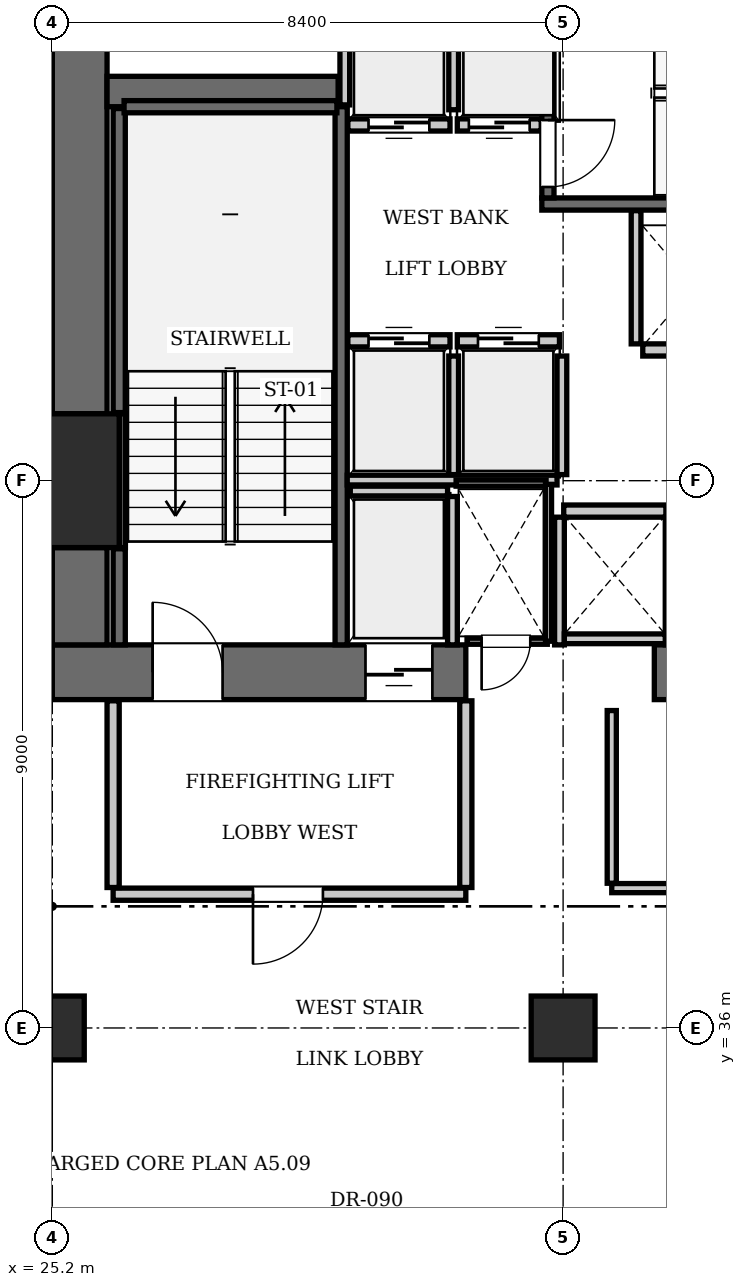
"""IFC4 building model, lengths in metres.
Left out: names, types, materials, properties, quantities, classifications, styles, units other than length and angle.
Written with IfcOpenShell. Run it as: python <this file> out.ifc"""

import sys

from ifc_helpers import new_model, si_unit, direction, frame, frame_2d, origin, origin_2d, place, context, subcontext, project, spatial, rectangle, extrude, element, fill, save


model = new_model("IFC4")
c1 = context("Model", 3, precision=1e-05, world=origin(), true_north=direction((0.0, 1.0)))
c2 = subcontext(c1, "Body", "Model", "MODEL_VIEW")
j1 = project(units=[si_unit("LENGTHUNIT", "METRE"), si_unit("PLANEANGLEUNIT", "RADIAN")], contexts=[c1])
p1 = place(None, origin())
s1 = spatial("IfcSite", under=j1, at=p1, CompositionType="ELEMENT")
p2 = place(p1, origin())
s2 = spatial("IfcBuilding", under=s1, at=p2, CompositionType="ELEMENT")
p3 = place(p2, frame((0.0, 0.0, 30.8)))
s3 = spatial("IfcBuildingStorey", under=s2, at=p3, CompositionType="ELEMENT", Elevation=30.8)
p4 = place(p3, frame((25.2, 45.0, 0.0), z_axis=(0.0, 0.0, 1.0), x_axis=(1.0, 0.0, 0.0)))
e1 = element("IfcColumn", 1, at=p4, inside=s3, PredefinedType="COLUMN", context=c2, shape_type="SweptSolid", body=[
    extrude(rectangle(XDim=2.2, YDim=2.2, at=origin_2d()), origin(), (0.0, 0.0, 1.0), 3.85),
])
p5 = place(p3, frame((25.2, 41.85, 0.0), z_axis=(0.0, 0.0, 1.0), x_axis=(1.0, 0.0, 0.0)))
e2 = element("IfcWall", 2, at=p5, inside=s3, PredefinedType="SHEAR", context=c2, shape_type="SweptSolid", body=[
    extrude(rectangle(XDim=6.8, YDim=0.9, at=frame_2d((3.4, 0.0))), origin(), (0.0, 0.0, 1.0), 3.85),
])
p6 = place(p5, frame((1.65, 0.0, 0.0)))
e3 = element("IfcOpeningElement", 3, at=p6, cuts=e2, PredefinedType="OPENING", context=c2, shape_type="SweptSolid", body=[
    extrude(rectangle(XDim=1.15, YDim=2.15, at=frame_2d((0.575, 1.075))), frame((0.0, 0.46, 0.0), z_axis=(0.0, -1.0, 0.0), x_axis=(1.0, 0.0, 0.0)), (0.0, 0.0, 1.0), 0.92),
])
p7 = place(p5, frame((5.15, 0.0, 0.0)))
e4 = element("IfcOpeningElement", 4, at=p7, cuts=e2, PredefinedType="OPENING", context=c2, shape_type="SweptSolid", body=[
    extrude(rectangle(XDim=1.1, YDim=2.2, at=frame_2d((0.55, 1.1))), frame((0.0, 0.46, 0.0), z_axis=(0.0, -1.0, 0.0), x_axis=(1.0, 0.0, 0.0)), (0.0, 0.0, 1.0), 0.92),
])
p8 = place(p3, frame((35.1, 41.85, 0.0), z_axis=(0.0, 0.0, 1.0), x_axis=(1.0, 0.0, 0.0)))
e5 = element("IfcWall", 5, at=p8, inside=s3, PredefinedType="SHEAR", context=c2, shape_type="SweptSolid", body=[
    extrude(rectangle(XDim=5.4, YDim=0.9, at=frame_2d((2.7, 0.0))), origin(), (0.0, 0.0, 1.0), 3.85),
])
p9 = place(p3, frame((25.65, 42.3, 0.0), z_axis=(0.0, 0.0, 1.0), x_axis=(0.0, 1.0, 0.0)))
e6 = element("IfcWall", 6, at=p9, inside=s3, PredefinedType="SHEAR", context=c2, shape_type="SweptSolid", body=[
    extrude(rectangle(XDim=1.6, YDim=0.9, at=frame_2d((0.8, 0.0))), origin(), (0.0, 0.0, 1.0), 3.85),
])
p10 = place(p3, frame((25.65, 46.1, 0.0), z_axis=(0.0, 0.0, 1.0), x_axis=(0.0, 1.0, 0.0)))
e7 = element("IfcWall", 7, at=p10, inside=s3, PredefinedType="SHEAR", context=c2, shape_type="SweptSolid", body=[
    extrude(rectangle(XDim=7.0, YDim=0.9, at=frame_2d((3.5, 0.0))), origin(), (0.0, 0.0, 1.0), 3.85),
])
p11 = place(p3, frame((26.1, 51.4, 0.0), z_axis=(0.0, 0.0, 1.0), x_axis=(1.0, 0.0, 0.0)))
e8 = element("IfcWall", 8, at=p11, inside=s3, PredefinedType="SHEAR", context=c2, shape_type="SweptSolid", body=[
    extrude(rectangle(XDim=3.8, YDim=0.5, at=frame_2d((1.9, 0.0))), origin(), (0.0, 0.0, 1.0), 3.85),
])
for number, where, z_axis, x_axis in (
    (9, (25.2, 36.0, 0.0), (0.0, 0.0, 1.0), (1.0, 0.0, 0.0)),
    (10, (33.6, 36.0, 0.0), (0.0, 0.0, 1.0), (1.0, 0.0, 0.0)),
):
    element("IfcColumn", number, at=place(p3, frame(where, z_axis=z_axis, x_axis=x_axis)), inside=s3, PredefinedType="COLUMN", context=c2, shape_type="SweptSolid", body=[
        extrude(rectangle(XDim=1.05, YDim=1.05, at=origin_2d()), origin(), (0.0, 0.0, 1.0), 3.85),
    ])
p12 = place(p3, frame((29.95, 42.3, 0.0), z_axis=(0.0, 0.0, 1.0), x_axis=(0.0, 1.0, 0.0)))
e11 = element("IfcWall", 11, at=p12, inside=s3, PredefinedType="SOLIDWALL", context=c2, shape_type="SweptSolid", body=[
    extrude(rectangle(XDim=8.85, YDim=0.2, at=frame_2d((4.425, 0.0))), origin(), (0.0, 0.0, 1.0), 3.61),
])
p13 = place(p3, frame((26.3, 42.3, 0.0), z_axis=(0.0, 0.0, 1.0), x_axis=(0.0, 1.0, 0.0)))
e12 = element("IfcWall", 12, at=p13, inside=s3, PredefinedType="SOLIDWALL", context=c2, shape_type="SweptSolid", body=[
    extrude(rectangle(XDim=1.58, YDim=0.2, at=frame_2d((0.79, 0.0))), origin(), (0.0, 0.0, 1.0), 3.61),
])
p14 = place(p3, frame((26.3, 46.12, 0.0), z_axis=(0.0, 0.0, 1.0), x_axis=(0.0, 1.0, 0.0)))
e13 = element("IfcWall", 13, at=p14, inside=s3, PredefinedType="SOLIDWALL", context=c2, shape_type="SweptSolid", body=[
    extrude(rectangle(XDim=5.0, YDim=0.2, at=frame_2d((2.5, 0.0))), origin(), (0.0, 0.0, 1.0), 3.61),
])
p15 = place(p3, frame((26.38, 51.15, 0.0), z_axis=(0.0, 0.0, 1.0), x_axis=(1.0, 0.0, 0.0)))
e14 = element("IfcWall", 14, at=p15, inside=s3, PredefinedType="SOLIDWALL", context=c2, shape_type="SweptSolid", body=[
    extrude(rectangle(XDim=3.5, YDim=0.2, at=frame_2d((1.75, 0.0))), origin(), (0.0, 0.0, 1.0), 3.61),
])
p16 = place(p3, frame((26.352, 43.9, 0.0), z_axis=(0.0, 0.0, 1.0), x_axis=(0.0, 1.0, 0.0)))
e15 = element("IfcWall", 15, at=p16, inside=s3, PredefinedType="SOLIDWALL", context=c2, shape_type="SweptSolid", body=[
    extrude(rectangle(XDim=2.2, YDim=0.1, at=frame_2d((1.1, 0.0))), origin(), (0.0, 0.0, 1.0), 3.61),
])
p17 = place(p3, frame((33.25, 49.55, 0.0), z_axis=(0.0, 0.0, 1.0), x_axis=(1.0, 0.0, 0.0)))
e16 = element("IfcWall", 16, at=p17, inside=s3, PredefinedType="SOLIDWALL", context=c2, shape_type="SweptSolid", body=[
    extrude(rectangle(XDim=9.1, YDim=0.2, at=frame_2d((4.55, 0.0))), origin(), (0.0, 0.0, 1.0), 3.61),
])
p18 = place(p3, frame((33.35, 49.65, 0.0), z_axis=(0.0, 0.0, 1.0), x_axis=(0.0, 1.0, 0.0)))
e17 = element("IfcWall", 17, at=p18, inside=s3, PredefinedType="SOLIDWALL", context=c2, shape_type="SweptSolid", body=[
    extrude(rectangle(XDim=3.45, YDim=0.2, at=frame_2d((1.725, 0.0))), origin(), (0.0, 0.0, 1.0), 3.61),
])
p19 = place(p18, frame((0.18, 0.0, 0.0)))
e18 = element("IfcOpeningElement", 18, at=p19, cuts=e17, PredefinedType="OPENING", context=c2, shape_type="SweptSolid", body=[
    extrude(rectangle(XDim=1.1, YDim=2.15, at=frame_2d((0.55, 1.075))), frame((0.0, 0.11, 0.0), z_axis=(0.0, -1.0, 0.0), x_axis=(1.0, 0.0, 0.0)), (0.0, 0.0, 1.0), 0.22),
])
p20 = place(p3, frame((30.06, 47.3, 0.0), z_axis=(0.0, 0.0, 1.0), x_axis=(1.0, 0.0, 0.0)))
e19 = element("IfcWall", 19, at=p20, inside=s3, PredefinedType="SOLIDWALL", context=c2, shape_type="SweptSolid", body=[
    extrude(rectangle(XDim=1.68, YDim=0.2, at=frame_2d((0.84, 0.0))), origin(), (0.0, 0.0, 1.0), 3.61),
])
p21 = place(p20, frame((0.34, 0.0, 0.0)))
e20 = element("IfcOpeningElement", 20, at=p21, cuts=e19, PredefinedType="OPENING", context=c2, shape_type="SweptSolid", body=[
    extrude(rectangle(XDim=1.0, YDim=2.15, at=frame_2d((0.5, 1.075))), frame((0.0, 0.11, 0.0), z_axis=(0.0, -1.0, 0.0), x_axis=(1.0, 0.0, 0.0)), (0.0, 0.0, 1.0), 0.22),
])
p22 = place(p3, frame((31.86, 47.3, 0.0), z_axis=(0.0, 0.0, 1.0), x_axis=(1.0, 0.0, 0.0)))
e21 = element("IfcWall", 21, at=p22, inside=s3, PredefinedType="SOLIDWALL", context=c2, shape_type="SweptSolid", body=[
    extrude(rectangle(XDim=1.68, YDim=0.2, at=frame_2d((0.84, 0.0))), origin(), (0.0, 0.0, 1.0), 3.61),
])
p23 = place(p22, frame((0.34, 0.0, 0.0)))
e22 = element("IfcOpeningElement", 22, at=p23, cuts=e21, PredefinedType="OPENING", context=c2, shape_type="SweptSolid", body=[
    extrude(rectangle(XDim=1.0, YDim=2.15, at=frame_2d((0.5, 1.075))), frame((0.0, 0.11, 0.0), z_axis=(0.0, -1.0, 0.0), x_axis=(1.0, 0.0, 0.0)), (0.0, 0.0, 1.0), 0.22),
])
p24 = place(p3, frame((30.06, 50.85, 0.0), z_axis=(0.0, 0.0, 1.0), x_axis=(1.0, 0.0, 0.0)))
e23 = element("IfcWall", 23, at=p24, inside=s3, PredefinedType="SOLIDWALL", context=c2, shape_type="SweptSolid", body=[
    extrude(rectangle(XDim=1.68, YDim=0.2, at=frame_2d((0.84, 0.0))), origin(), (0.0, 0.0, 1.0), 3.61),
])
p25 = place(p24, frame((0.34, 0.0, 0.0)))
e24 = element("IfcOpeningElement", 24, at=p25, cuts=e23, PredefinedType="OPENING", context=c2, shape_type="SweptSolid", body=[
    extrude(rectangle(XDim=1.0, YDim=2.15, at=frame_2d((0.5, 1.075))), frame((0.0, 0.11, 0.0), z_axis=(0.0, -1.0, 0.0), x_axis=(1.0, 0.0, 0.0)), (0.0, 0.0, 1.0), 0.22),
])
p26 = place(p3, frame((31.86, 50.85, 0.0), z_axis=(0.0, 0.0, 1.0), x_axis=(1.0, 0.0, 0.0)))
e25 = element("IfcWall", 25, at=p26, inside=s3, PredefinedType="SOLIDWALL", context=c2, shape_type="SweptSolid", body=[
    extrude(rectangle(XDim=1.38, YDim=0.2, at=frame_2d((0.69, 0.0))), origin(), (0.0, 0.0, 1.0), 3.61),
])
p27 = place(p26, frame((0.19, 0.0, 0.0)))
e26 = element("IfcOpeningElement", 26, at=p27, cuts=e25, PredefinedType="OPENING", context=c2, shape_type="SweptSolid", body=[
    extrude(rectangle(XDim=1.0, YDim=2.15, at=frame_2d((0.5, 1.075))), frame((0.0, 0.11, 0.0), z_axis=(0.0, -1.0, 0.0), x_axis=(1.0, 0.0, 0.0)), (0.0, 0.0, 1.0), 0.22),
])
p28 = place(p3, frame((34.91, 47.15, 0.0), z_axis=(0.0, 0.0, 1.0), x_axis=(1.0, 0.0, 0.0)))
e27 = element("IfcWall", 27, at=p28, inside=s3, PredefinedType="SOLIDWALL", context=c2, shape_type="SweptSolid", body=[
    extrude(rectangle(XDim=1.68, YDim=0.2, at=frame_2d((0.84, 0.0))), origin(), (0.0, 0.0, 1.0), 3.61),
])
p29 = place(p3, frame((33.61, 44.5, 0.0), z_axis=(0.0, 0.0, 1.0), x_axis=(1.0, 0.0, 0.0)))
e28 = element("IfcWall", 28, at=p29, inside=s3, PredefinedType="SOLIDWALL", context=c2, shape_type="SweptSolid", body=[
    extrude(rectangle(XDim=1.68, YDim=0.2, at=frame_2d((0.84, 0.0))), origin(), (0.0, 0.0, 1.0), 3.61),
])
p30 = place(p3, frame((30.1, 44.83, 0.0), z_axis=(0.0, 0.0, 1.0), x_axis=(1.0, 0.0, 0.0)))
e29 = element("IfcWall", 29, at=p30, inside=s3, PredefinedType="SOLIDWALL", context=c2, shape_type="SweptSolid", body=[
    extrude(rectangle(XDim=1.6, YDim=0.16, at=frame_2d((0.8, 0.0))), origin(), (0.0, 0.0, 1.0), 3.61),
])
p31 = place(p3, frame((31.78, 42.3, 0.0), z_axis=(0.0, 0.0, 1.0), x_axis=(0.0, 1.0, 0.0)))
e30 = element("IfcWall", 30, at=p31, inside=s3, PredefinedType="SOLIDWALL", context=c2, shape_type="SweptSolid", body=[
    extrude(rectangle(XDim=2.44, YDim=0.16, at=frame_2d((1.22, 0.0))), origin(), (0.0, 0.0, 1.0), 3.61),
])
for number, where, z_axis, x_axis in (
    (31, (31.8, 45.1, 0.0), (0.0, 0.0, 1.0), (0.0, 1.0, 0.0)),
    (32, (33.58, 45.1, 0.0), (0.0, 0.0, 1.0), (0.0, 1.0, 0.0)),
):
    element("IfcWall", number, at=place(p3, frame(where, z_axis=z_axis, x_axis=x_axis)), inside=s3, PredefinedType="SOLIDWALL", context=c2, shape_type="SweptSolid", body=[
        extrude(rectangle(XDim=1.95, YDim=0.16, at=frame_2d((0.975, 0.0))), origin(), (0.0, 0.0, 1.0), 3.61),
    ])
p32 = place(p3, frame((30.05, 45.01, 0.0), z_axis=(0.0, 0.0, 1.0), x_axis=(1.0, 0.0, 0.0)))
e33 = element("IfcWall", 33, at=p32, inside=s3, PredefinedType="SOLIDWALL", context=c2, shape_type="SweptSolid", body=[
    extrude(rectangle(XDim=3.45, YDim=0.16, at=frame_2d((1.725, 0.0))), origin(), (0.0, 0.0, 1.0), 3.61),
])
p33 = place(p3, frame((30.01, 51.18, 0.0), z_axis=(0.0, 0.0, 1.0), x_axis=(0.0, 1.0, 0.0)))
e34 = element("IfcWall", 34, at=p33, inside=s3, PredefinedType="SOLIDWALL", context=c2, shape_type="SweptSolid", body=[
    extrude(rectangle(XDim=1.92, YDim=0.16, at=frame_2d((0.96, 0.0))), origin(), (0.0, 0.0, 1.0), 3.61),
])
p34 = place(p3, frame((31.8, 51.1, 0.0), z_axis=(0.0, 0.0, 1.0), x_axis=(0.0, 1.0, 0.0)))
e35 = element("IfcWall", 35, at=p34, inside=s3, PredefinedType="SOLIDWALL", context=c2, shape_type="SweptSolid", body=[
    extrude(rectangle(XDim=2.0, YDim=0.16, at=frame_2d((1.0, 0.0))), origin(), (0.0, 0.0, 1.0), 3.61),
])
p35 = place(p3, frame((34.8, 47.25, 0.0), z_axis=(0.0, 0.0, 1.0), x_axis=(0.0, 1.0, 0.0)))
e36 = element("IfcWall", 36, at=p35, inside=s3, PredefinedType="SOLIDWALL", context=c2, shape_type="SweptSolid", body=[
    extrude(rectangle(XDim=2.19, YDim=0.16, at=frame_2d((1.095, 0.0))), origin(), (0.0, 0.0, 1.0), 3.61),
])
for number, where, z_axis, x_axis in (
    (37, (33.54, 42.3, 0.0), (0.0, 0.0, 1.0), (0.0, 1.0, 0.0)),
    (38, (35.36, 42.3, 0.0), (0.0, 0.0, 1.0), (0.0, 1.0, 0.0)),
):
    element("IfcWall", number, at=place(p3, frame(where, z_axis=z_axis, x_axis=x_axis)), inside=s3, PredefinedType="SOLIDWALL", context=c2, shape_type="SweptSolid", body=[
        extrude(rectangle(XDim=2.1, YDim=0.16, at=frame_2d((1.05, 0.0))), origin(), (0.0, 0.0, 1.0), 3.61),
    ])
p36 = place(p3, frame((33.62, 42.4, 0.0), z_axis=(0.0, 0.0, 1.0), x_axis=(1.0, 0.0, 0.0)))
e39 = element("IfcWall", 39, at=p36, inside=s3, PredefinedType="SOLIDWALL", context=c2, shape_type="SweptSolid", body=[
    extrude(rectangle(XDim=1.66, YDim=0.16, at=frame_2d((0.83, 0.0))), origin(), (0.0, 0.0, 1.0), 3.61),
])
p37 = place(p3, frame((26.2, 38.2, 0.0), z_axis=(0.0, 0.0, 1.0), x_axis=(1.0, 0.0, 0.0)))
e40 = element("IfcWall", 40, at=p37, inside=s3, PredefinedType="PARTITIONING", context=c2, shape_type="SweptSolid", body=[
    extrude(rectangle(XDim=5.8, YDim=0.2, at=frame_2d((2.9, 0.0))), origin(), (0.0, 0.0, 1.0), 3.61),
])
p38 = place(p37, frame((2.3, 0.0, 0.0)))
e41 = element("IfcOpeningElement", 41, at=p38, cuts=e40, PredefinedType="OPENING", context=c2, shape_type="SweptSolid", body=[
    extrude(rectangle(XDim=1.15, YDim=2.15, at=frame_2d((0.575, 1.075))), frame((0.0, 0.11, 0.0), z_axis=(0.0, -1.0, 0.0), x_axis=(1.0, 0.0, 0.0)), (0.0, 0.0, 1.0), 0.22),
])
for number, where, z_axis, x_axis in (
    (42, (26.2, 38.31, 0.0), (0.0, 0.0, 1.0), (0.0, 1.0, 0.0)),
    (43, (32.0, 38.31, 0.0), (0.0, 0.0, 1.0), (0.0, 1.0, 0.0)),
):
    element("IfcWall", number, at=place(p3, frame(where, z_axis=z_axis, x_axis=x_axis)), inside=s3, PredefinedType="PARTITIONING", context=c2, shape_type="SweptSolid", body=[
        extrude(rectangle(XDim=3.07, YDim=0.2, at=frame_2d((1.535, 0.0))), origin(), (0.0, 0.0, 1.0), 3.61),
    ])
p39 = place(p3, frame((32.02, 42.36, 0.0), z_axis=(0.0, 0.0, 1.0), x_axis=(1.0, 0.0, 0.0)))
e44 = element("IfcWall", 44, at=p39, inside=s3, PredefinedType="PARTITIONING", context=c2, shape_type="SweptSolid", body=[
    extrude(rectangle(XDim=1.32, YDim=0.1, at=frame_2d((0.66, 0.0))), origin(), (0.0, 0.0, 1.0), 3.61),
])
p40 = place(p39, frame((0.24, 0.0, 0.0)))
e45 = element("IfcOpeningElement", 45, at=p40, cuts=e44, PredefinedType="OPENING", context=c2, shape_type="SweptSolid", body=[
    extrude(rectangle(XDim=0.8, YDim=2.05, at=frame_2d((0.4, 1.025))), frame((0.0, 0.06, 0.0), z_axis=(0.0, -1.0, 0.0), x_axis=(1.0, 0.0, 0.0)), (0.0, 0.0, 1.0), 0.12),
])
p41 = place(p3, frame((31.84, 44.96, 0.0), z_axis=(0.0, 0.0, 1.0), x_axis=(1.0, 0.0, 0.0)))
e46 = element("IfcWall", 46, at=p41, inside=s3, PredefinedType="PARTITIONING", context=c2, shape_type="SweptSolid", body=[
    extrude(rectangle(XDim=1.48, YDim=0.1, at=frame_2d((0.74, 0.0))), origin(), (0.0, 0.0, 1.0), 3.61),
])
p42 = place(p3, frame((33.36, 42.36, 0.0), z_axis=(0.0, 0.0, 1.0), x_axis=(0.0, 1.0, 0.0)))
e47 = element("IfcWall", 47, at=p42, inside=s3, PredefinedType="PARTITIONING", context=c2, shape_type="SweptSolid", body=[
    extrude(rectangle(XDim=2.58, YDim=0.1, at=frame_2d((1.29, 0.0))), origin(), (0.0, 0.0, 1.0), 3.61),
])
p43 = place(p3, frame((34.4, 38.3, 0.0), z_axis=(0.0, 0.0, 1.0), x_axis=(1.0, 0.0, 0.0)))
e48 = element("IfcWall", 48, at=p43, inside=s3, PredefinedType="PARTITIONING", context=c2, shape_type="SweptSolid", body=[
    extrude(rectangle(XDim=5.92, YDim=0.15, at=frame_2d((2.96, 0.0))), origin(), (0.0, 0.0, 1.0), 3.61),
])
p44 = place(p43, frame((2.4, 0.0, 0.0)))
e49 = element("IfcOpeningElement", 49, at=p44, cuts=e48, PredefinedType="OPENING", context=c2, shape_type="SweptSolid", body=[
    extrude(rectangle(XDim=0.9, YDim=2.1, at=frame_2d((0.45, 1.05))), frame((0.0, 0.085, 0.0), z_axis=(0.0, -1.0, 0.0), x_axis=(1.0, 0.0, 0.0)), (0.0, 0.0, 1.0), 0.17),
])
p45 = place(p3, frame((34.4, 38.38, 0.0), z_axis=(0.0, 0.0, 1.0), x_axis=(0.0, 1.0, 0.0)))
e50 = element("IfcWall", 50, at=p45, inside=s3, PredefinedType="PARTITIONING", context=c2, shape_type="SweptSolid", body=[
    extrude(rectangle(XDim=2.84, YDim=0.15, at=frame_2d((1.42, 0.0))), origin(), (0.0, 0.0, 1.0), 3.61),
])
p46 = place(p6, origin())
e51 = element("IfcDoor", 51, at=p46, inside=s3, OperationType="SINGLE_SWING_LEFT", PredefinedType="DOOR", context=c2, shape_type="SweptSolid", body=[
    extrude(rectangle(XDim=1.15, YDim=2.15, at=frame_2d((0.575, 1.075))), frame((0.0, 0.025, 0.0), z_axis=(0.0, -1.0, 0.0), x_axis=(1.0, 0.0, 0.0)), (0.0, 0.0, 1.0), 0.05),
])
fill(e3, e51)
p47 = place(p19, frame((1.1, 0.0, 0.0), z_axis=(0.0, 0.0, 1.0), x_axis=(-1.0, 0.0, 0.0)))
e52 = element("IfcDoor", 52, at=p47, inside=s3, OperationType="SINGLE_SWING_LEFT", PredefinedType="DOOR", context=c2, shape_type="SweptSolid", body=[
    extrude(rectangle(XDim=1.1, YDim=2.15, at=frame_2d((0.55, 1.075))), frame((0.0, 0.025, 0.0), z_axis=(0.0, -1.0, 0.0), x_axis=(1.0, 0.0, 0.0)), (0.0, 0.0, 1.0), 0.05),
])
fill(e18, e52)
p48 = place(p21, origin())
e53 = element("IfcDoor", 53, at=p48, inside=s3, OperationType="SLIDING_TO_LEFT", PredefinedType="DOOR", context=c2, shape_type="SweptSolid", body=[
    extrude(rectangle(XDim=1.0, YDim=2.15, at=frame_2d((0.5, 1.075))), frame((0.0, 0.025, 0.0), z_axis=(0.0, -1.0, 0.0), x_axis=(1.0, 0.0, 0.0)), (0.0, 0.0, 1.0), 0.05),
])
fill(e20, e53)
p49 = place(p23, origin())
e54 = element("IfcDoor", 54, at=p49, inside=s3, OperationType="SLIDING_TO_LEFT", PredefinedType="DOOR", context=c2, shape_type="SweptSolid", body=[
    extrude(rectangle(XDim=1.0, YDim=2.15, at=frame_2d((0.5, 1.075))), frame((0.0, 0.025, 0.0), z_axis=(0.0, -1.0, 0.0), x_axis=(1.0, 0.0, 0.0)), (0.0, 0.0, 1.0), 0.05),
])
fill(e22, e54)
p50 = place(p25, frame((1.0, 0.0, 0.0), z_axis=(0.0, 0.0, 1.0), x_axis=(-1.0, 0.0, 0.0)))
e55 = element("IfcDoor", 55, at=p50, inside=s3, OperationType="SLIDING_TO_LEFT", PredefinedType="DOOR", context=c2, shape_type="SweptSolid", body=[
    extrude(rectangle(XDim=1.0, YDim=2.15, at=frame_2d((0.5, 1.075))), frame((0.0, 0.025, 0.0), z_axis=(0.0, -1.0, 0.0), x_axis=(1.0, 0.0, 0.0)), (0.0, 0.0, 1.0), 0.05),
])
fill(e24, e55)
p51 = place(p27, frame((1.0, 0.0, 0.0), z_axis=(0.0, 0.0, 1.0), x_axis=(-1.0, 0.0, 0.0)))
e56 = element("IfcDoor", 56, at=p51, inside=s3, OperationType="SLIDING_TO_LEFT", PredefinedType="DOOR", context=c2, shape_type="SweptSolid", body=[
    extrude(rectangle(XDim=1.0, YDim=2.15, at=frame_2d((0.5, 1.075))), frame((0.0, 0.025, 0.0), z_axis=(0.0, -1.0, 0.0), x_axis=(1.0, 0.0, 0.0)), (0.0, 0.0, 1.0), 0.05),
])
fill(e26, e56)
p52 = place(p7, frame((1.1, 0.0, 0.0), z_axis=(0.0, 0.0, 1.0), x_axis=(-1.0, 0.0, 0.0)))
e57 = element("IfcDoor", 57, at=p52, inside=s3, OperationType="SLIDING_TO_LEFT", PredefinedType="DOOR", context=c2, shape_type="SweptSolid", body=[
    extrude(rectangle(XDim=1.1, YDim=2.2, at=frame_2d((0.55, 1.1))), frame((0.0, 0.025, 0.0), z_axis=(0.0, -1.0, 0.0), x_axis=(1.0, 0.0, 0.0)), (0.0, 0.0, 1.0), 0.05),
])
fill(e4, e57)
p53 = place(p38, frame((1.15, 0.0, 0.0), z_axis=(0.0, 0.0, 1.0), x_axis=(-1.0, 0.0, 0.0)))
e58 = element("IfcDoor", 58, at=p53, inside=s3, OperationType="SINGLE_SWING_RIGHT", PredefinedType="DOOR", context=c2, shape_type="SweptSolid", body=[
    extrude(rectangle(XDim=1.15, YDim=2.15, at=frame_2d((0.575, 1.075))), frame((0.0, 0.025, 0.0), z_axis=(0.0, -1.0, 0.0), x_axis=(1.0, 0.0, 0.0)), (0.0, 0.0, 1.0), 0.05),
])
fill(e41, e58)
p54 = place(p40, frame((0.8, 0.0, 0.0), z_axis=(0.0, 0.0, 1.0), x_axis=(-1.0, 0.0, 0.0)))
e59 = element("IfcDoor", 59, at=p54, inside=s3, OperationType="SINGLE_SWING_RIGHT", PredefinedType="DOOR", context=c2, shape_type="SweptSolid", body=[
    extrude(rectangle(XDim=0.8, YDim=2.05, at=frame_2d((0.4, 1.025))), frame((0.0, 0.025, 0.0), z_axis=(0.0, -1.0, 0.0), x_axis=(1.0, 0.0, 0.0)), (0.0, 0.0, 1.0), 0.05),
])
fill(e45, e59)
save(model, sys.argv[1])
